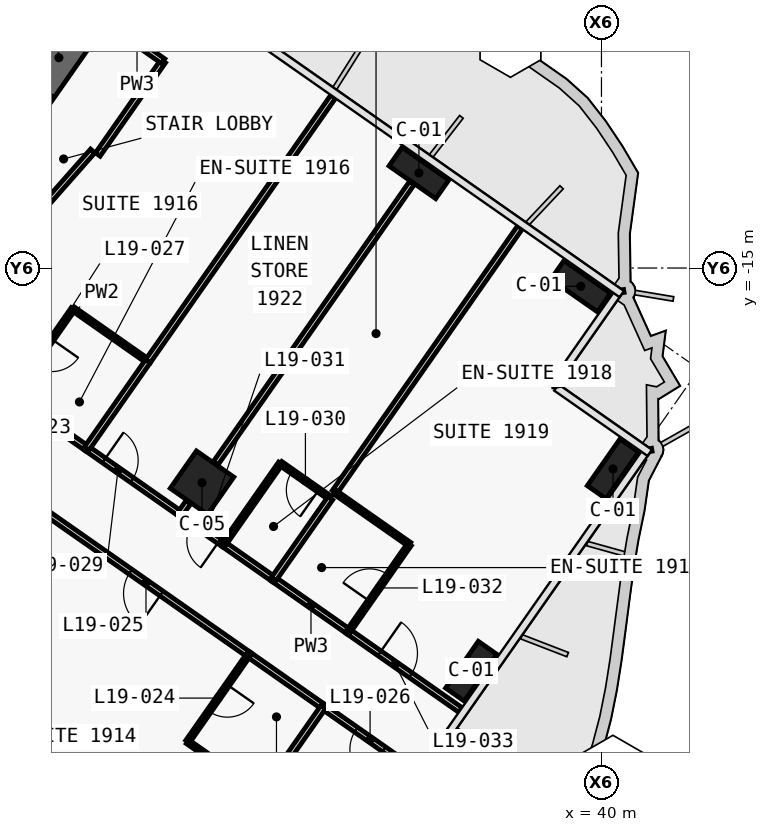
"""IFC4 building model, lengths in metres.
Left out: names, types, materials, properties, quantities, classifications, styles, units other than length and angle.
Written with IfcOpenShell. Run it as: python <this file> out.ifc"""

import sys

from ifc_helpers import new_model, si_unit, direction, frame, frame_2d, origin, origin_2d, place, context, subcontext, project, spatial, polyline, rectangle, outline, extrude, element, fill, save


model = new_model("IFC4")
c1 = context("Model", 3, precision=1e-05, world=origin(), true_north=direction((0.0, 1.0)))
c2 = subcontext(c1, "Body", "Model", "MODEL_VIEW")
j1 = project(units=[si_unit("LENGTHUNIT", "METRE"), si_unit("PLANEANGLEUNIT", "RADIAN")], contexts=[c1])
p1 = place(None, origin())
s1 = spatial("IfcSite", under=j1, at=p1, CompositionType="ELEMENT")
p2 = place(p1, origin())
s2 = spatial("IfcBuilding", under=s1, at=p2, CompositionType="ELEMENT")
p3 = place(p2, frame((0.0, 0.0, 94.1)))
s3 = spatial("IfcBuildingStorey", under=s2, at=p3, CompositionType="ELEMENT", Elevation=94.1)
p4 = place(p3, frame((21.708, -15.2, 0.0), z_axis=(0.0, 0.0, 1.0), x_axis=(0.573576324356, 0.819152122709, 0.0)))
e1 = element("IfcWall", 1, at=p4, inside=s3, PredefinedType="SHEAR", context=c2, shape_type="SweptSolid", body=[
    extrude(outline(polyline([(9.2, 0.5), (0.0, 0.5), (0.0, -0.5), (9.2, -0.5), (9.2, 0.5)])), origin(), (0.0, 0.0, 1.0), 3.6),
])
p5 = place(p4, frame((6.1, 0.0, 0.0)))
e2 = element("IfcOpeningElement", 2, at=p5, cuts=e1, PredefinedType="OPENING", context=c2, shape_type="SweptSolid", body=[
    extrude(rectangle(XDim=1.8, YDim=2.1, at=frame_2d((0.9, 1.05))), frame((0.0, 0.51, 0.0), z_axis=(0.0, -1.0, 0.0), x_axis=(1.0, 0.0, 0.0)), (0.0, 0.0, 1.0), 1.02),
])
p6 = place(p4, frame((1.9, 0.0, 0.0)))
e3 = element("IfcOpeningElement", 3, at=p6, cuts=e1, PredefinedType="OPENING", context=c2, shape_type="SweptSolid", body=[
    extrude(rectangle(XDim=1.8, YDim=2.1, at=frame_2d((0.9, 1.05))), frame((0.0, 0.51, 0.0), z_axis=(0.0, -1.0, 0.0), x_axis=(1.0, 0.0, 0.0)), (0.0, 0.0, 1.0), 1.02),
])
for number, where, z_axis, x_axis in (
    (4, (35.197, -12.498, 0.0), (0.0, 0.0, 1.0), (0.819, -0.574, 0.0)),
    (5, (39.456, -15.481, 0.0), (0.0, 0.0, 1.0), (0.819, -0.574, 0.0)),
    (6, (36.575, -25.61, 0.0), (0.0, 0.0, 1.0), (0.574, 0.819, 0.0)),
    (7, (40.303, -20.286, 0.0), (0.0, 0.0, 1.0), (0.574, 0.819, 0.0)),
):
    element("IfcColumn", number, at=place(p3, frame(where, z_axis=z_axis, x_axis=x_axis)), inside=s3, PredefinedType="COLUMN", context=c2, shape_type="SweptSolid", body=[
        extrude(rectangle(XDim=1.5, YDim=0.6, at=origin_2d()), origin(), (0.0, 0.0, 1.0), 3.6),
    ])
p7 = place(p3, frame((29.49, -20.649, 0.0), z_axis=(0.0, 0.0, 1.0), x_axis=(0.819152044289, -0.573576436351, 0.0)))
e8 = element("IfcColumn", 8, at=p7, inside=s3, PredefinedType="COLUMN", context=c2, shape_type="SweptSolid", body=[
    extrude(rectangle(XDim=1.2, YDim=1.2, at=origin_2d()), origin(), (0.0, 0.0, 1.0), 3.6),
])
p8 = place(p3, frame((24.491, -18.369, 0.0), z_axis=(0.0, 0.0, 1.0), x_axis=(0.819179439794, -0.573537309527, 0.0)))
e9 = element("IfcWall", 9, at=p8, inside=s3, PredefinedType="PARTITIONING", context=c2, shape_type="SweptSolid", body=[
    extrude(rectangle(XDim=2.404, YDim=0.15, at=frame_2d((1.202, 0.0))), origin(), (0.0, 0.0, 1.0), 3.32),
])
p9 = place(p3, frame((26.457, -19.746, 0.0), z_axis=(0.0, 0.0, 1.0), x_axis=(0.81916700466, -0.573555070134, 0.0)))
e10 = element("IfcWall", 10, at=p9, inside=s3, PredefinedType="PARTITIONING", context=c2, shape_type="SweptSolid", body=[
    extrude(rectangle(XDim=3.004, YDim=0.15, at=frame_2d((1.502, 0.0))), origin(), (0.0, 0.0, 1.0), 2.6),
])
p10 = place(p9, frame((0.552, 0.0, 0.0)))
e11 = element("IfcOpeningElement", 11, at=p10, cuts=e10, PredefinedType="OPENING", context=c2, shape_type="SweptSolid", body=[
    extrude(rectangle(XDim=0.9, YDim=2.1, at=frame_2d((0.45, 1.05))), frame((0.0, 0.085, 0.0), z_axis=(0.0, -1.0, 0.0), x_axis=(1.0, 0.0, 0.0)), (0.0, 0.0, 1.0), 0.17),
])
p11 = place(p3, frame((30.063, -22.271, 0.0), z_axis=(0.0, 0.0, 1.0), x_axis=(-0.81914197737, 0.573590813132, 0.0)))
e12 = element("IfcWall", 12, at=p11, inside=s3, PredefinedType="PARTITIONING", context=c2, shape_type="SweptSolid", body=[
    extrude(rectangle(XDim=1.403, YDim=0.15, at=frame_2d((0.701, 0.0))), origin(), (0.0, 0.0, 1.0), 2.6),
])
p12 = place(p11, frame((0.15, 0.0, 0.0)))
e13 = element("IfcOpeningElement", 13, at=p12, cuts=e12, PredefinedType="OPENING", context=c2, shape_type="SweptSolid", body=[
    extrude(rectangle(XDim=0.85, YDim=2.1, at=frame_2d((0.425, 1.05))), frame((0.0, 0.085, 0.0), z_axis=(0.0, -1.0, 0.0), x_axis=(1.0, 0.0, 0.0)), (0.0, 0.0, 1.0), 0.17),
])
p13 = place(p3, frame((30.061, -22.27, 0.0), z_axis=(0.0, 0.0, 1.0), x_axis=(0.819189013667, -0.573523634986, 0.0)))
e14 = element("IfcWall", 14, at=p13, inside=s3, PredefinedType="PARTITIONING", context=c2, shape_type="SweptSolid", body=[
    extrude(rectangle(XDim=1.604, YDim=0.15, at=frame_2d((0.802, 0.0))), origin(), (0.0, 0.0, 1.0), 3.32),
])
p14 = place(p3, frame((33.338, -24.565, 0.0), z_axis=(0.0, 0.0, 1.0), x_axis=(0.819171400631, -0.573548791636, 0.0)))
e15 = element("IfcWall", 15, at=p14, inside=s3, PredefinedType="PARTITIONING", context=c2, shape_type="SweptSolid", body=[
    extrude(rectangle(XDim=3.601, YDim=0.15, at=frame_2d((1.801, 0.0))), origin(), (0.0, 0.0, 1.0), 2.5),
])
p15 = place(p14, frame((1.001, 0.0, 0.0)))
e16 = element("IfcOpeningElement", 16, at=p15, cuts=e15, PredefinedType="OPENING", context=c2, shape_type="SweptSolid", body=[
    extrude(rectangle(XDim=1.0, YDim=2.1, at=frame_2d((0.5, 1.05))), frame((0.0, 0.085, 0.0), z_axis=(0.0, -1.0, 0.0), x_axis=(1.0, 0.0, 0.0)), (0.0, 0.0, 1.0), 0.17),
])
p16 = place(p3, frame((31.372, -23.188, 0.0), z_axis=(0.0, 0.0, 1.0), x_axis=(0.819179439794, -0.573537309527, 0.0)))
e17 = element("IfcWall", 17, at=p16, inside=s3, PredefinedType="PARTITIONING", context=c2, shape_type="SweptSolid", body=[
    extrude(rectangle(XDim=2.404, YDim=0.15, at=frame_2d((1.202, 0.0))), origin(), (0.0, 0.0, 1.0), 3.32),
])
p17 = place(p3, frame((30.719, -25.172, 0.0), z_axis=(0.0, 0.0, 1.0), x_axis=(-0.819153746897, 0.573574004767, 0.0)))
e18 = element("IfcWall", 18, at=p17, inside=s3, PredefinedType="PARTITIONING", context=c2, shape_type="SweptSolid", body=[
    extrude(rectangle(XDim=6.603, YDim=0.15, at=frame_2d((3.302, 0.0))), origin(), (0.0, 0.0, 1.0), 2.6),
])
p18 = place(p17, frame((2.801, 0.0, 0.0)))
e19 = element("IfcOpeningElement", 19, at=p18, cuts=e18, PredefinedType="OPENING", context=c2, shape_type="SweptSolid", body=[
    extrude(rectangle(XDim=1.0, YDim=2.1, at=frame_2d((0.5, 1.05))), frame((0.0, 0.085, 0.0), z_axis=(0.0, -1.0, 0.0), x_axis=(1.0, 0.0, 0.0)), (0.0, 0.0, 1.0), 0.17),
])
p19 = place(p3, frame((32.685, -26.549, 0.0), z_axis=(0.0, 0.0, 1.0), x_axis=(-0.819146032251, 0.573585022335, 0.0)))
e20 = element("IfcWall", 20, at=p19, inside=s3, PredefinedType="PARTITIONING", context=c2, shape_type="SweptSolid", body=[
    extrude(rectangle(XDim=2.404, YDim=0.15, at=frame_2d((1.202, 0.0))), origin(), (0.0, 0.0, 1.0), 3.32),
])
p20 = place(p3, frame((35.141, -28.268, 0.0), z_axis=(0.0, 0.0, 1.0), x_axis=(-0.81915932427, 0.57356603932, 0.0)))
e21 = element("IfcWall", 21, at=p20, inside=s3, PredefinedType="PARTITIONING", context=c2, shape_type="SweptSolid", body=[
    extrude(rectangle(XDim=3.002, YDim=0.15, at=frame_2d((1.501, 0.0))), origin(), (0.0, 0.0, 1.0), 2.5),
])
p21 = place(p20, frame((1.051, 0.0, 0.0)))
e22 = element("IfcOpeningElement", 22, at=p21, cuts=e21, PredefinedType="OPENING", context=c2, shape_type="SweptSolid", body=[
    extrude(rectangle(XDim=0.9, YDim=2.1, at=frame_2d((0.45, 1.05))), frame((0.0, 0.085, 0.0), z_axis=(0.0, -1.0, 0.0), x_axis=(1.0, 0.0, 0.0)), (0.0, 0.0, 1.0), 0.17),
])
p22 = place(p3, frame((26.098, -16.076, 0.0), z_axis=(0.0, 0.0, 1.0), x_axis=(-0.573550118428, -0.819170471667, 0.0)))
e23 = element("IfcWall", 23, at=p22, inside=s3, PredefinedType="PARTITIONING", context=c2, shape_type="SweptSolid", body=[
    extrude(rectangle(XDim=2.8, YDim=0.12, at=frame_2d((1.4, 0.0))), origin(), (0.0, 0.0, 1.0), 2.6),
])
p23 = place(p22, frame((0.975, 0.0, 0.0)))
e24 = element("IfcOpeningElement", 24, at=p23, cuts=e23, PredefinedType="OPENING", context=c2, shape_type="SweptSolid", body=[
    extrude(rectangle(XDim=0.85, YDim=2.05, at=frame_2d((0.425, 1.025))), frame((0.0, 0.07, 0.0), z_axis=(0.0, -1.0, 0.0), x_axis=(1.0, 0.0, 0.0)), (0.0, 0.0, 1.0), 0.14),
])
p24 = place(p3, frame((28.065, -17.453, 0.0), z_axis=(0.0, 0.0, 1.0), x_axis=(-0.819155442668, 0.573571582932, 0.0)))
e25 = element("IfcWall", 25, at=p24, inside=s3, PredefinedType="PARTITIONING", context=c2, shape_type="SweptSolid", body=[
    extrude(rectangle(XDim=2.4, YDim=0.12, at=frame_2d((1.2, 0.0))), origin(), (0.0, 0.0, 1.0), 3.32),
])
p25 = place(p3, frame((32.94, -10.491, 0.0), z_axis=(0.0, 0.0, 1.0), x_axis=(-0.573593433868, -0.819140142237, 0.0)))
e26 = element("IfcWall", 26, at=p25, inside=s3, PredefinedType="PARTITIONING", context=c2, shape_type="SweptSolid", body=[
    extrude(rectangle(XDim=8.499, YDim=0.15, at=frame_2d((4.25, 0.0))), origin(), (0.0, 0.0, 1.0), 2.6),
])
p26 = place(p3, frame((22.285, -16.825, 0.0), z_axis=(0.0, 0.0, 1.0), x_axis=(0.661551268245, 0.749899939647, 0.0)))
e27 = element("IfcWall", 27, at=p26, inside=s3, PredefinedType="PARTITIONING", context=c2, shape_type="SweptSolid", body=[
    extrude(rectangle(XDim=6.541, YDim=0.15, at=frame_2d((3.271, 0.0))), origin(), (0.0, 0.0, 1.0), 2.6),
])
p27 = place(p3, frame((26.746, -12.014, 0.0), z_axis=(0.0, 0.0, 1.0), x_axis=(0.573560650686, 0.819163097304, 0.0)))
e28 = element("IfcWall", 28, at=p27, inside=s3, PredefinedType="PARTITIONING", context=c2, shape_type="SweptSolid", body=[
    extrude(rectangle(XDim=3.0, YDim=0.15, at=frame_2d((1.5, 0.0))), origin(), (0.0, 0.0, 1.0), 3.32),
])
p28 = place(p3, frame((28.467, -9.556, 0.0), z_axis=(0.0, 0.0, 1.0), x_axis=(-0.819109000826, 0.573637903879, 0.0)))
e29 = element("IfcWall", 29, at=p28, inside=s3, PredefinedType="PARTITIONING", context=c2, shape_type="SweptSolid", body=[
    extrude(rectangle(XDim=1.68, YDim=0.15, at=frame_2d((0.84, 0.0))), origin(), (0.0, 0.0, 1.0), 3.32),
])
p29 = place(p3, frame((28.064, -17.454, 0.0), z_axis=(0.0, 0.0, 1.0), x_axis=(-0.573550118428, -0.819170471667, 0.0)))
e30 = element("IfcWall", 30, at=p29, inside=s3, PredefinedType="PARTITIONING", context=c2, shape_type="SweptSolid", body=[
    extrude(rectangle(XDim=2.8, YDim=0.15, at=frame_2d((1.4, 0.0))), origin(), (0.0, 0.0, 1.0), 2.6),
])
p30 = place(p3, frame((35.013, -12.76, 0.0), z_axis=(0.0, 0.0, 1.0), x_axis=(-0.573558725113, -0.819164445546, 0.0)))
e31 = element("IfcWall", 31, at=p30, inside=s3, PredefinedType="PARTITIONING", context=c2, shape_type="SweptSolid", body=[
    extrude(rectangle(XDim=9.01, YDim=0.15, at=frame_2d((4.505, 0.0))), origin(), (0.0, 0.0, 1.0), 2.6),
])
p31 = place(p3, frame((29.134, -21.156, 0.0), z_axis=(0.0, 0.0, 1.0), x_axis=(-0.572944929411, -0.819593867633, 0.0)))
e32 = element("IfcWall", 32, at=p31, inside=s3, PredefinedType="PARTITIONING", context=c2, shape_type="SweptSolid", body=[
    extrude(rectangle(XDim=0.38, YDim=0.15, at=frame_2d((0.19, 0.0))), origin(), (0.0, 0.0, 1.0), 2.6),
])
p32 = place(p3, frame((32.865, -21.058, 0.0), z_axis=(0.0, 0.0, 1.0), x_axis=(-0.819131543282, 0.57360571371, 0.0)))
e33 = element("IfcWall", 33, at=p32, inside=s3, PredefinedType="PARTITIONING", context=c2, shape_type="SweptSolid", body=[
    extrude(rectangle(XDim=1.6, YDim=0.12, at=frame_2d((0.8, 0.0))), origin(), (0.0, 0.0, 1.0), 3.32),
])
p33 = place(p32, frame((0.375, 0.0, 0.0)))
e34 = element("IfcOpeningElement", 34, at=p33, cuts=e33, PredefinedType="OPENING", context=c2, shape_type="SweptSolid", body=[
    extrude(rectangle(XDim=0.85, YDim=2.05, at=frame_2d((0.425, 1.025))), frame((0.0, 0.07, 0.0), z_axis=(0.0, -1.0, 0.0), x_axis=(1.0, 0.0, 0.0)), (0.0, 0.0, 1.0), 0.14),
])
p34 = place(p3, frame((31.553, -20.14, 0.0), z_axis=(0.0, 0.0, 1.0), x_axis=(-0.573537965655, -0.819178980414, 0.0)))
e35 = element("IfcWall", 35, at=p34, inside=s3, PredefinedType="PARTITIONING", context=c2, shape_type="SweptSolid", body=[
    extrude(rectangle(XDim=2.6, YDim=0.12, at=frame_2d((1.3, 0.0))), origin(), (0.0, 0.0, 1.0), 2.6),
])
p35 = place(p3, frame((37.855, -13.932, 0.0), z_axis=(0.0, 0.0, 1.0), x_axis=(-0.573576058406, -0.819152308929, 0.0)))
e36 = element("IfcWall", 36, at=p35, inside=s3, PredefinedType="PARTITIONING", context=c2, shape_type="SweptSolid", body=[
    extrude(rectangle(XDim=8.501, YDim=0.15, at=frame_2d((4.25, 0.0))), origin(), (0.0, 0.0, 1.0), 2.5),
])
p36 = place(p3, frame((32.865, -21.059, 0.0), z_axis=(0.0, 0.0, 1.0), x_axis=(-0.573600972199, -0.819134863556, 0.0)))
e37 = element("IfcWall", 37, at=p36, inside=s3, PredefinedType="PARTITIONING", context=c2, shape_type="SweptSolid", body=[
    extrude(rectangle(XDim=2.6, YDim=0.15, at=frame_2d((1.3, 0.0))), origin(), (0.0, 0.0, 1.0), 2.6),
])
p37 = place(p3, frame((33.34, -24.566, 0.0), z_axis=(0.0, 0.0, 1.0), x_axis=(0.573608623498, 0.819129505664, 0.0)))
e38 = element("IfcWall", 38, at=p37, inside=s3, PredefinedType="PARTITIONING", context=c2, shape_type="SweptSolid", body=[
    extrude(rectangle(XDim=2.8, YDim=0.12, at=frame_2d((1.4, 0.0))), origin(), (0.0, 0.0, 1.0), 2.6),
])
p38 = place(p37, frame((0.975, 0.0, 0.0)))
e39 = element("IfcOpeningElement", 39, at=p38, cuts=e38, PredefinedType="OPENING", context=c2, shape_type="SweptSolid", body=[
    extrude(rectangle(XDim=0.85, YDim=2.05, at=frame_2d((0.425, 1.025))), frame((0.0, 0.07, 0.0), z_axis=(0.0, -1.0, 0.0), x_axis=(1.0, 0.0, 0.0)), (0.0, 0.0, 1.0), 0.14),
])
p39 = place(p3, frame((34.946, -22.271, 0.0), z_axis=(0.0, 0.0, 1.0), x_axis=(-0.819155442668, 0.573571582932, 0.0)))
e40 = element("IfcWall", 40, at=p39, inside=s3, PredefinedType="PARTITIONING", context=c2, shape_type="SweptSolid", body=[
    extrude(rectangle(XDim=2.4, YDim=0.12, at=frame_2d((1.2, 0.0))), origin(), (0.0, 0.0, 1.0), 3.32),
])
p40 = place(p3, frame((30.717, -25.17, 0.0), z_axis=(0.0, 0.0, 1.0), x_axis=(-0.573550118428, -0.819170471667, 0.0)))
e41 = element("IfcWall", 41, at=p40, inside=s3, PredefinedType="PARTITIONING", context=c2, shape_type="SweptSolid", body=[
    extrude(rectangle(XDim=2.8, YDim=0.12, at=frame_2d((1.4, 0.0))), origin(), (0.0, 0.0, 1.0), 3.32),
])
p41 = place(p40, frame((0.975, 0.0, 0.0)))
e42 = element("IfcOpeningElement", 42, at=p41, cuts=e41, PredefinedType="OPENING", context=c2, shape_type="SweptSolid", body=[
    extrude(rectangle(XDim=0.85, YDim=2.05, at=frame_2d((0.425, 1.025))), frame((0.0, 0.07, 0.0), z_axis=(0.0, -1.0, 0.0), x_axis=(1.0, 0.0, 0.0)), (0.0, 0.0, 1.0), 0.14),
])
p42 = place(p3, frame((29.111, -27.466, 0.0), z_axis=(0.0, 0.0, 1.0), x_axis=(0.819188907105, -0.573523787192, 0.0)))
e43 = element("IfcWall", 43, at=p42, inside=s3, PredefinedType="PARTITIONING", context=c2, shape_type="SweptSolid", body=[
    extrude(rectangle(XDim=2.4, YDim=0.12, at=frame_2d((1.2, 0.0))), origin(), (0.0, 0.0, 1.0), 3.32),
])
p43 = place(p3, frame((32.684, -26.548, 0.0), z_axis=(0.0, 0.0, 1.0), x_axis=(-0.573550118428, -0.819170471667, 0.0)))
e44 = element("IfcWall", 44, at=p43, inside=s3, PredefinedType="PARTITIONING", context=c2, shape_type="SweptSolid", body=[
    extrude(rectangle(XDim=2.8, YDim=0.15, at=frame_2d((1.4, 0.0))), origin(), (0.0, 0.0, 1.0), 3.32),
])
p44 = place(p5, origin())
e45 = element("IfcDoor", 45, at=p44, inside=s3, OperationType="DOUBLE_DOOR_SINGLE_SWING", PredefinedType="DOOR", context=c2, shape_type="SweptSolid", body=[
    extrude(rectangle(XDim=1.8, YDim=2.1, at=frame_2d((0.9, 1.05))), frame((0.0, 0.025, 0.0), z_axis=(0.0, -1.0, 0.0), x_axis=(1.0, 0.0, 0.0)), (0.0, 0.0, 1.0), 0.05),
])
fill(e2, e45)
p45 = place(p41, origin())
e46 = element("IfcDoor", 46, at=p45, inside=s3, OperationType="SINGLE_SWING_RIGHT", PredefinedType="DOOR", context=c2, shape_type="SweptSolid", body=[
    extrude(rectangle(XDim=0.85, YDim=2.05, at=frame_2d((0.425, 1.025))), frame((0.0, 0.025, 0.0), z_axis=(0.0, -1.0, 0.0), x_axis=(1.0, 0.0, 0.0)), (0.0, 0.0, 1.0), 0.05),
])
fill(e42, e46)
p46 = place(p18, origin())
e47 = element("IfcDoor", 47, at=p46, inside=s3, OperationType="SINGLE_SWING_RIGHT", PredefinedType="DOOR", context=c2, shape_type="SweptSolid", body=[
    extrude(rectangle(XDim=1.0, YDim=2.1, at=frame_2d((0.5, 1.05))), frame((0.0, 0.025, 0.0), z_axis=(0.0, -1.0, 0.0), x_axis=(1.0, 0.0, 0.0)), (0.0, 0.0, 1.0), 0.05),
])
fill(e19, e47)
p47 = place(p21, origin())
e48 = element("IfcDoor", 48, at=p47, inside=s3, OperationType="SINGLE_SWING_LEFT", PredefinedType="DOOR", context=c2, shape_type="SweptSolid", body=[
    extrude(rectangle(XDim=0.9, YDim=2.1, at=frame_2d((0.45, 1.05))), frame((0.0, 0.025, 0.0), z_axis=(0.0, -1.0, 0.0), x_axis=(1.0, 0.0, 0.0)), (0.0, 0.0, 1.0), 0.05),
])
fill(e22, e48)
p48 = place(p10, origin())
e49 = element("IfcDoor", 49, at=p48, inside=s3, OperationType="SINGLE_SWING_LEFT", PredefinedType="DOOR", context=c2, shape_type="SweptSolid", body=[
    extrude(rectangle(XDim=0.9, YDim=2.1, at=frame_2d((0.45, 1.05))), frame((0.0, 0.025, 0.0), z_axis=(0.0, -1.0, 0.0), x_axis=(1.0, 0.0, 0.0)), (0.0, 0.0, 1.0), 0.05),
])
fill(e11, e49)
p49 = place(p33, origin())
e50 = element("IfcDoor", 50, at=p49, inside=s3, OperationType="SINGLE_SWING_RIGHT", PredefinedType="DOOR", context=c2, shape_type="SweptSolid", body=[
    extrude(rectangle(XDim=0.85, YDim=2.05, at=frame_2d((0.425, 1.025))), frame((0.0, 0.025, 0.0), z_axis=(0.0, -1.0, 0.0), x_axis=(1.0, 0.0, 0.0)), (0.0, 0.0, 1.0), 0.05),
])
fill(e34, e50)
p50 = place(p12, origin())
e51 = element("IfcDoor", 51, at=p50, inside=s3, OperationType="SINGLE_SWING_RIGHT", PredefinedType="DOOR", context=c2, shape_type="SweptSolid", body=[
    extrude(rectangle(XDim=0.85, YDim=2.1, at=frame_2d((0.425, 1.05))), frame((0.0, 0.025, 0.0), z_axis=(0.0, -1.0, 0.0), x_axis=(1.0, 0.0, 0.0)), (0.0, 0.0, 1.0), 0.05),
])
fill(e13, e51)
p51 = place(p38, origin())
e52 = element("IfcDoor", 52, at=p51, inside=s3, OperationType="SINGLE_SWING_RIGHT", PredefinedType="DOOR", context=c2, shape_type="SweptSolid", body=[
    extrude(rectangle(XDim=0.85, YDim=2.05, at=frame_2d((0.425, 1.025))), frame((0.0, 0.025, 0.0), z_axis=(0.0, -1.0, 0.0), x_axis=(1.0, 0.0, 0.0)), (0.0, 0.0, 1.0), 0.05),
])
fill(e39, e52)
p52 = place(p15, origin())
e53 = element("IfcDoor", 53, at=p52, inside=s3, OperationType="SINGLE_SWING_RIGHT", PredefinedType="DOOR", context=c2, shape_type="SweptSolid", body=[
    extrude(rectangle(XDim=1.0, YDim=2.1, at=frame_2d((0.5, 1.05))), frame((0.0, 0.025, 0.0), z_axis=(0.0, -1.0, 0.0), x_axis=(1.0, 0.0, 0.0)), (0.0, 0.0, 1.0), 0.05),
])
fill(e16, e53)
save(model, sys.argv[1])
